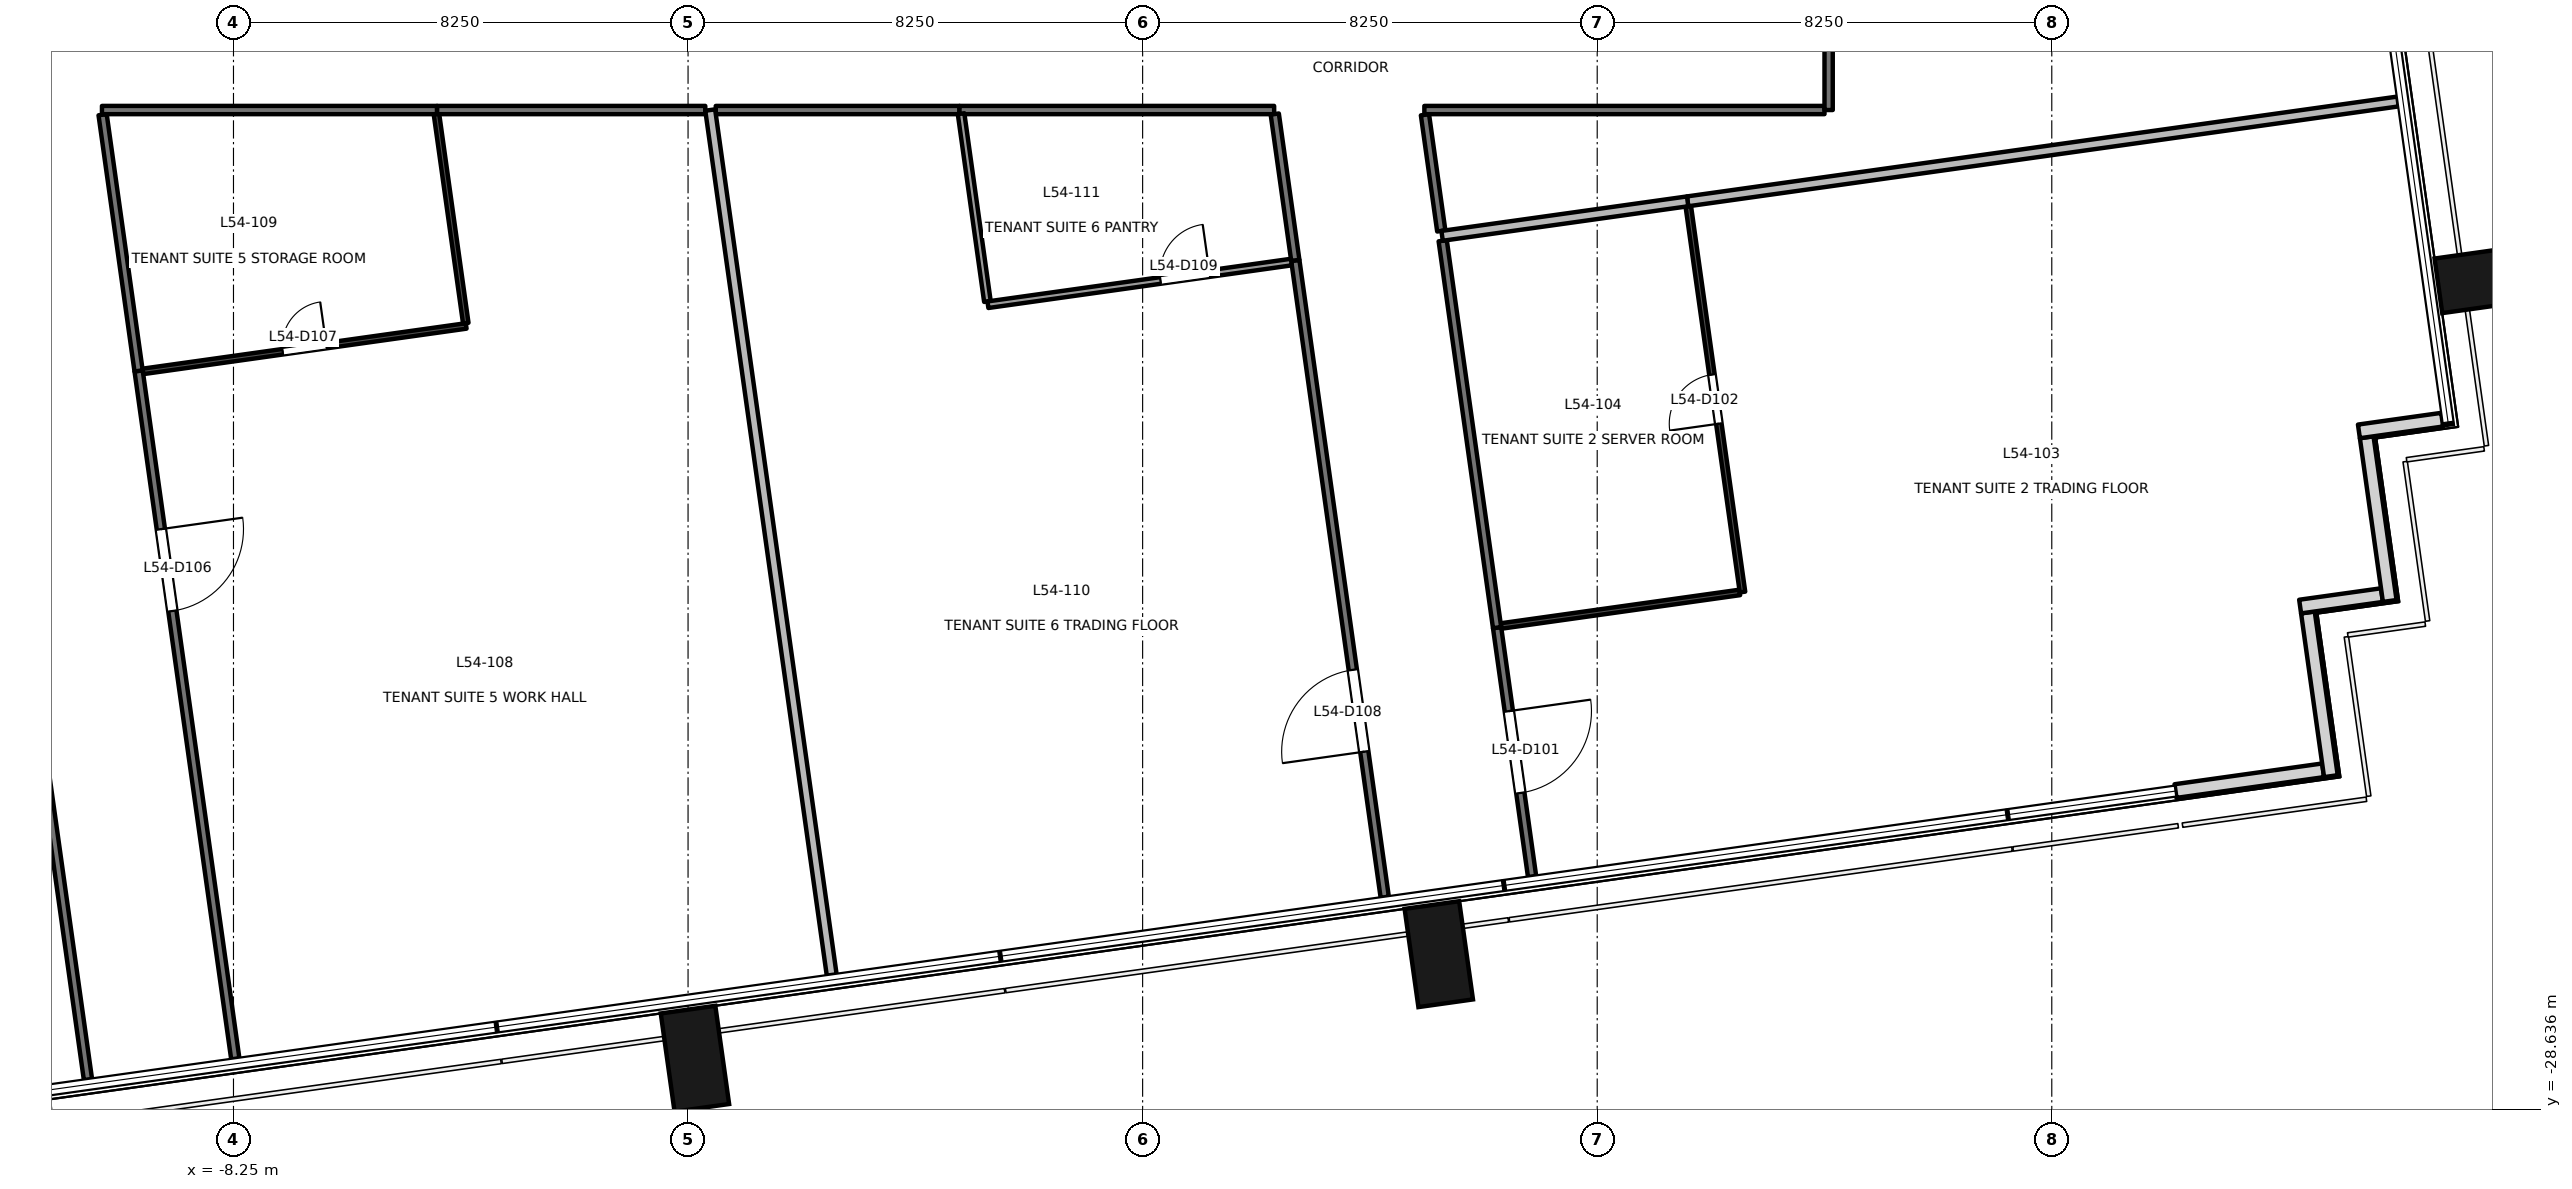
"""IFC4 building model, lengths in metres.
Left out: names, types, materials, properties, quantities, classifications, styles, units other than length and angle.
Written with IfcOpenShell. Run it as: python <this file> out.ifc"""

import sys

from ifc_helpers import new_model, si_unit, direction, frame, frame_2d, origin, origin_2d, place, context, subcontext, project, spatial, rectangle, extrude, element, fill, save


model = new_model("IFC4")
c1 = context("Model", 3, precision=1e-05, world=origin(), true_north=direction((0.0, 1.0)))
c2 = subcontext(c1, "Body", "Model", "MODEL_VIEW")
j1 = project(units=[si_unit("LENGTHUNIT", "METRE"), si_unit("PLANEANGLEUNIT", "RADIAN")], contexts=[c1])
p1 = place(None, origin())
s1 = spatial("IfcSite", under=j1, at=p1, CompositionType="ELEMENT")
p2 = place(p1, origin())
s2 = spatial("IfcBuilding", under=s1, at=p2, CompositionType="ELEMENT")
p3 = place(p2, frame((0.0, 0.0, 236.9)))
s3 = spatial("IfcBuildingStorey", under=s2, at=p3, CompositionType="ELEMENT", Elevation=236.9)
for number, where, z_axis, x_axis in (
    (1, (-11.971, -29.416, -0.2), (0.0, 0.0, 1.0), (0.99, 0.139, 0.0)),
    (2, (0.125, -27.716, -0.2), (0.0, 0.0, 1.0), (0.99, 0.139, 0.0)),
    (3, (13.625, -25.818, -0.2), (0.0, 0.0, 1.0), (0.99, 0.139, 0.0)),
    (4, (32.658, -13.565, -0.2), (0.0, 0.0, 1.0), (-0.139, 0.99, 0.0)),
):
    element("IfcColumn", number, at=place(p3, frame(where, z_axis=z_axis, x_axis=x_axis)), inside=s3, PredefinedType="COLUMN", context=c2, shape_type="SweptSolid", body=[
        extrude(rectangle(XDim=1.0, YDim=1.8, at=origin_2d()), origin(), (0.0, 0.0, 1.0), 3.9),
    ])
p4 = place(p3, frame((26.995, -22.859, 0.0), z_axis=(0.0, 0.0, 1.0), x_axis=(0.99024510326, 0.139336411139, 0.0)))
e5 = element("IfcWall", 5, at=p4, inside=s3, PredefinedType="SOLIDWALL", context=c2, shape_type="SweptSolid", body=[
    extrude(rectangle(XDim=2.705, YDim=0.25, at=frame_2d((1.353, 0.0))), origin(), (0.0, 0.0, 1.0), 3.7),
])
p5 = place(p3, frame((29.815, -22.588, 0.0), z_axis=(0.0, 0.0, 1.0), x_axis=(-0.138983028379, 0.9902947631, 0.0)))
e6 = element("IfcWall", 6, at=p5, inside=s3, PredefinedType="SOLIDWALL", context=c2, shape_type="SweptSolid", body=[
    extrude(rectangle(XDim=3.0, YDim=0.25, at=frame_2d((1.5, 0.0))), origin(), (0.0, 0.0, 1.0), 3.7),
])
p6 = place(p3, frame((29.257, -19.51, 0.0), z_axis=(0.0, 0.0, 1.0), x_axis=(0.990330117064, 0.138730887823, 0.0)))
e7 = element("IfcWall", 7, at=p6, inside=s3, PredefinedType="SOLIDWALL", context=c2, shape_type="SweptSolid", body=[
    extrude(rectangle(XDim=1.499, YDim=0.25, at=frame_2d((0.75, 0.0))), origin(), (0.0, 0.0, 1.0), 3.7),
])
p7 = place(p3, frame((30.883, -19.409, 0.0), z_axis=(0.0, 0.0, 1.0), x_axis=(-0.139324658755, 0.990246756855, 0.0)))
e8 = element("IfcWall", 8, at=p7, inside=s3, PredefinedType="SOLIDWALL", context=c2, shape_type="SweptSolid", body=[
    extrude(rectangle(XDim=3.0, YDim=0.25, at=frame_2d((1.5, 0.0))), origin(), (0.0, 0.0, 1.0), 3.7),
])
p8 = place(p3, frame((30.324, -16.332, 0.0), z_axis=(0.0, 0.0, 1.0), x_axis=(0.990238641016, 0.139382329723, 0.0)))
e9 = element("IfcWall", 9, at=p8, inside=s3, PredefinedType="SOLIDWALL", context=c2, shape_type="SweptSolid", body=[
    extrude(rectangle(XDim=1.526, YDim=0.25, at=frame_2d((0.763, 0.0))), origin(), (0.0, 0.0, 1.0), 3.7),
])
p9 = place(p3, frame((-10.891, -28.093, 0.0), z_axis=(0.0, 0.0, 1.0), x_axis=(-0.139139234553, 0.990272827764, 0.0)))
e10 = element("IfcWall", 10, at=p9, inside=s3, PredefinedType="PARTITIONING", context=c2, shape_type="SweptSolid", body=[
    extrude(rectangle(XDim=17.766, YDim=0.15, at=frame_2d((8.883, 0.0))), origin(), (0.0, 0.0, 1.0), 3.7),
])
p10 = place(p9, frame((8.133, 0.0, 0.0)))
e11 = element("IfcOpeningElement", 11, at=p10, cuts=e10, PredefinedType="OPENING", context=c2, shape_type="SweptSolid", body=[
    extrude(rectangle(XDim=1.5, YDim=2.1, at=frame_2d((0.75, 1.05))), frame((0.0, 0.085, 0.0), z_axis=(0.0, -1.0, 0.0), x_axis=(1.0, 0.0, 0.0)), (0.0, 0.0, 1.0), 0.171),
])
p11 = place(p3, frame((14.683, -19.893, 0.0), z_axis=(0.0, 0.0, 1.0), x_axis=(0.139247448871, -0.990257616978, 0.0)))
e12 = element("IfcWall", 12, at=p11, inside=s3, PredefinedType="PARTITIONING", context=c2, shape_type="SweptSolid", body=[
    extrude(rectangle(XDim=4.56, YDim=0.15, at=frame_2d((2.28, 0.0))), origin(), (0.0, 0.0, 1.0), 3.7),
])
p12 = place(p11, frame((1.53, 0.0, 0.0)))
e13 = element("IfcOpeningElement", 13, at=p12, cuts=e12, PredefinedType="OPENING", context=c2, shape_type="SweptSolid", body=[
    extrude(rectangle(XDim=1.5, YDim=2.1, at=frame_2d((0.75, 1.05))), frame((0.0, 0.085, 0.0), z_axis=(0.0, -1.0, 0.0), x_axis=(1.0, 0.0, 0.0)), (0.0, 0.0, 1.0), 0.171),
])
p13 = place(p3, frame((13.696, -12.872, 0.0), z_axis=(0.0, 0.0, 1.0), x_axis=(0.139217899128, -0.990261771736, 0.0)))
e14 = element("IfcWall", 14, at=p13, inside=s3, PredefinedType="PARTITIONING", context=c2, shape_type="SweptSolid", body=[
    extrude(rectangle(XDim=7.09, YDim=0.15, at=frame_2d((3.545, 0.0))), origin(), (0.0, 0.0, 1.0), 2.9),
])
p14 = place(p3, frame((13.374, -10.586, 0.0), z_axis=(0.0, 0.0, 1.0), x_axis=(0.13899652087, -0.990292869401, 0.0)))
e15 = element("IfcWall", 15, at=p14, inside=s3, PredefinedType="PARTITIONING", context=c2, shape_type="SweptSolid", body=[
    extrude(rectangle(XDim=2.129, YDim=0.15, at=frame_2d((1.064, 0.0))), origin(), (0.0, 0.0, 1.0), 2.9),
])
p15 = place(p3, frame((20.625, -10.5, 0.0), z_axis=(0.0, 0.0, 1.0), x_axis=(-1.0, 0.0, 0.0)))
e16 = element("IfcWall", 16, at=p15, inside=s3, PredefinedType="PARTITIONING", context=c2, shape_type="SweptSolid", body=[
    extrude(rectangle(XDim=7.262, YDim=0.15, at=frame_2d((3.631, 0.0))), origin(), (0.0, 0.0, 1.0), 2.9),
])
p16 = place(p3, frame((20.7, -2.797, 0.0), z_axis=(0.0, 0.0, 1.0), x_axis=(0.0, -1.0, 0.0)))
e17 = element("IfcWall", 17, at=p16, inside=s3, PredefinedType="PARTITIONING", context=c2, shape_type="SweptSolid", body=[
    extrude(rectangle(XDim=7.703, YDim=0.15, at=frame_2d((3.852, 0.0))), origin(), (0.0, 0.0, 1.0), 3.1),
])
p17 = place(p16, frame((3.401, 0.0, 0.0)))
e18 = element("IfcOpeningElement", 18, at=p17, cuts=e17, PredefinedType="OPENING", context=c2, shape_type="SweptSolid", body=[
    extrude(rectangle(XDim=0.9, YDim=2.1, at=frame_2d((0.45, 1.05))), frame((0.0, 0.085, 0.0), z_axis=(0.0, -1.0, 0.0), x_axis=(1.0, 0.0, 0.0)), (0.0, 0.0, 1.0), 0.171),
])
p18 = place(p3, frame((-9.972, -15.233, 0.0), z_axis=(0.0, 0.0, 1.0), x_axis=(0.139200531242, -0.990264213279, 0.0)))
e19 = element("IfcWall", 19, at=p18, inside=s3, PredefinedType="PARTITIONING", context=c2, shape_type="SweptSolid", body=[
    extrude(rectangle(XDim=12.607, YDim=0.15, at=frame_2d((6.303, 0.0))), origin(), (0.0, 0.0, 1.0), 2.8),
])
p19 = place(p18, frame((2.901, 0.0, 0.0)))
e20 = element("IfcOpeningElement", 20, at=p19, cuts=e19, PredefinedType="OPENING", context=c2, shape_type="SweptSolid", body=[
    extrude(rectangle(XDim=1.5, YDim=2.1, at=frame_2d((0.75, 1.05))), frame((0.0, 0.085, 0.0), z_axis=(0.0, -1.0, 0.0), x_axis=(1.0, 0.0, 0.0)), (0.0, 0.0, 1.0), 0.171),
])
p20 = place(p3, frame((0.313, -10.5, 0.0), z_axis=(0.0, 0.0, 1.0), x_axis=(-1.0, 0.0, 0.0)))
e21 = element("IfcWall", 21, at=p20, inside=s3, PredefinedType="PARTITIONING", context=c2, shape_type="SweptSolid", body=[
    extrude(rectangle(XDim=4.87, YDim=0.15, at=frame_2d((2.435, 0.0))), origin(), (0.0, 0.0, 1.0), 2.8),
])
p21 = place(p3, frame((-10.625, -10.585, 0.0), z_axis=(0.0, 0.0, 1.0), x_axis=(0.139112996275, -0.990276514044, 0.0)))
e22 = element("IfcWall", 22, at=p21, inside=s3, PredefinedType="PARTITIONING", context=c2, shape_type="SweptSolid", body=[
    extrude(rectangle(XDim=4.695, YDim=0.15, at=frame_2d((2.347, 0.0))), origin(), (0.0, 0.0, 1.0), 3.7),
])
p22 = place(p3, frame((-4.557, -10.5, 0.0), z_axis=(0.0, 0.0, 1.0), x_axis=(-1.0, 0.0, 0.0)))
e23 = element("IfcWall", 23, at=p22, inside=s3, PredefinedType="PARTITIONING", context=c2, shape_type="SweptSolid", body=[
    extrude(rectangle(XDim=6.08, YDim=0.15, at=frame_2d((3.04, 0.0))), origin(), (0.0, 0.0, 1.0), 2.8),
])
p23 = place(p3, frame((4.926, -10.5, 0.0), z_axis=(0.0, 0.0, 1.0), x_axis=(-1.0, 0.0, 0.0)))
e24 = element("IfcWall", 24, at=p23, inside=s3, PredefinedType="PARTITIONING", context=c2, shape_type="SweptSolid", body=[
    extrude(rectangle(XDim=4.423, YDim=0.15, at=frame_2d((2.211, 0.0))), origin(), (0.0, 0.0, 1.0), 2.8),
])
p24 = place(p3, frame((12.644, -24.785, 0.0), z_axis=(0.0, 0.0, 1.0), x_axis=(-0.139086535292, 0.990280230894, 0.0)))
e25 = element("IfcWall", 25, at=p24, inside=s3, PredefinedType="PARTITIONING", context=c2, shape_type="SweptSolid", body=[
    extrude(rectangle(XDim=11.669, YDim=0.15, at=frame_2d((5.835, 0.0))), origin(), (0.0, 0.0, 1.0), 3.7),
])
p25 = place(p24, frame((2.667, 0.0, 0.0)))
e26 = element("IfcOpeningElement", 26, at=p25, cuts=e25, PredefinedType="OPENING", context=c2, shape_type="SweptSolid", body=[
    extrude(rectangle(XDim=1.5, YDim=2.1, at=frame_2d((0.75, 1.05))), frame((0.0, 0.085, 0.0), z_axis=(0.0, -1.0, 0.0), x_axis=(1.0, 0.0, 0.0)), (0.0, 0.0, 1.0), 0.171),
])
p26 = place(p3, frame((10.637, -10.5, 0.0), z_axis=(0.0, 0.0, 1.0), x_axis=(-1.0, 0.0, 0.0)))
e27 = element("IfcWall", 27, at=p26, inside=s3, PredefinedType="PARTITIONING", context=c2, shape_type="SweptSolid", body=[
    extrude(rectangle(XDim=5.711, YDim=0.15, at=frame_2d((2.855, 0.0))), origin(), (0.0, 0.0, 1.0), 2.8),
])
p27 = place(p3, frame((11.021, -13.228, 0.0), z_axis=(0.0, 0.0, 1.0), x_axis=(-0.139139027609, 0.990272856841, 0.0)))
e28 = element("IfcWall", 28, at=p27, inside=s3, PredefinedType="PARTITIONING", context=c2, shape_type="SweptSolid", body=[
    extrude(rectangle(XDim=2.681, YDim=0.15, at=frame_2d((1.341, 0.0))), origin(), (0.0, 0.0, 1.0), 3.7),
])
p28 = place(p3, frame((14.755, -19.863, 0.0), z_axis=(0.0, 0.0, 1.0), x_axis=(0.990258502699, 0.139241149923, 0.0)))
e29 = element("IfcWall", 29, at=p28, inside=s3, PredefinedType="PARTITIONING", context=c2, shape_type="SweptSolid", body=[
    extrude(rectangle(XDim=4.375, YDim=0.1, at=frame_2d((2.188, 0.0))), origin(), (0.0, 0.0, 1.0), 3.7),
])
p29 = place(p3, frame((19.137, -19.247, 0.0), z_axis=(0.0, 0.0, 1.0), x_axis=(-0.139168056016, 0.990268777749, 0.0)))
e30 = element("IfcWall", 30, at=p29, inside=s3, PredefinedType="PARTITIONING", context=c2, shape_type="SweptSolid", body=[
    extrude(rectangle(XDim=7.07, YDim=0.1, at=frame_2d((3.535, 0.0))), origin(), (0.0, 0.0, 1.0), 3.7),
])
p30 = place(p29, frame((3.085, 0.0, 0.0)))
e31 = element("IfcOpeningElement", 31, at=p30, cuts=e30, PredefinedType="OPENING", context=c2, shape_type="SweptSolid", body=[
    extrude(rectangle(XDim=0.9, YDim=2.1, at=frame_2d((0.45, 1.05))), frame((0.0, 0.061, 0.0), z_axis=(0.0, -1.0, 0.0), x_axis=(1.0, 0.0, 0.0)), (0.0, 0.0, 1.0), 0.121),
])
p31 = place(p3, frame((18.141, -12.157, 0.0), z_axis=(0.0, 0.0, 1.0), x_axis=(0.99026760598, 0.139176393637, 0.0)))
e32 = element("IfcWall", 32, at=p31, inside=s3, PredefinedType="PARTITIONING", context=c2, shape_type="SweptSolid", body=[
    extrude(rectangle(XDim=13.02, YDim=0.18, at=frame_2d((6.51, 0.0))), origin(), (0.0, 0.0, 1.0), 3.7),
])
p32 = place(p3, frame((13.685, -12.783, 0.0), z_axis=(0.0, 0.0, 1.0), x_axis=(0.99027667576, 0.139111845094, 0.0)))
e33 = element("IfcWall", 33, at=p32, inside=s3, PredefinedType="PARTITIONING", context=c2, shape_type="SweptSolid", body=[
    extrude(rectangle(XDim=4.5, YDim=0.18, at=frame_2d((2.25, 0.0))), origin(), (0.0, 0.0, 1.0), 3.7),
])
p33 = place(p3, frame((-9.894, -15.243, 0.0), z_axis=(0.0, 0.0, 1.0), x_axis=(0.990258620858, 0.139240309595, 0.0)))
e34 = element("IfcWall", 34, at=p33, inside=s3, PredefinedType="PARTITIONING", context=c2, shape_type="SweptSolid", body=[
    extrude(rectangle(XDim=5.925, YDim=0.1, at=frame_2d((2.962, 0.0))), origin(), (0.0, 0.0, 1.0), 2.8),
])
p34 = place(p33, frame((2.562, 0.0, 0.0)))
e35 = element("IfcOpeningElement", 35, at=p34, cuts=e34, PredefinedType="OPENING", context=c2, shape_type="SweptSolid", body=[
    extrude(rectangle(XDim=0.8, YDim=2.1, at=frame_2d((0.4, 1.05))), frame((0.0, 0.061, 0.0), z_axis=(0.0, -1.0, 0.0), x_axis=(1.0, 0.0, 0.0)), (0.0, 0.0, 1.0), 0.121),
])
p35 = place(p3, frame((-4.034, -14.368, 0.0), z_axis=(0.0, 0.0, 1.0), x_axis=(-0.138899955752, 0.990306418384, 0.0)))
e36 = element("IfcWall", 36, at=p35, inside=s3, PredefinedType="PARTITIONING", context=c2, shape_type="SweptSolid", body=[
    extrude(rectangle(XDim=3.837, YDim=0.1, at=frame_2d((1.918, 0.0))), origin(), (0.0, 0.0, 1.0), 2.8),
])
p36 = place(p3, frame((0.402, -10.5, 0.0), z_axis=(0.0, 0.0, 1.0), x_axis=(0.139104966254, -0.99027764206, 0.0)))
e37 = element("IfcWall", 37, at=p36, inside=s3, PredefinedType="PARTITIONING", context=c2, shape_type="SweptSolid", body=[
    extrude(rectangle(XDim=15.85, YDim=0.18, at=frame_2d((7.925, 0.0))), origin(), (0.0, 0.0, 1.0), 3.7),
])
p37 = place(p3, frame((4.955, -10.567, 0.0), z_axis=(0.0, 0.0, 1.0), x_axis=(0.138937352788, -0.990301172372, 0.0)))
e38 = element("IfcWall", 38, at=p37, inside=s3, PredefinedType="PARTITIONING", context=c2, shape_type="SweptSolid", body=[
    extrude(rectangle(XDim=3.441, YDim=0.12, at=frame_2d((1.72, 0.0))), origin(), (0.0, 0.0, 1.0), 3.7),
])
p38 = place(p3, frame((5.442, -14.033, 0.0), z_axis=(0.0, 0.0, 1.0), x_axis=(0.990269155404, 0.139165368738, 0.0)))
e39 = element("IfcWall", 39, at=p38, inside=s3, PredefinedType="PARTITIONING", context=c2, shape_type="SweptSolid", body=[
    extrude(rectangle(XDim=5.561, YDim=0.12, at=frame_2d((2.781, 0.0))), origin(), (0.0, 0.0, 1.0), 2.8),
])
p39 = place(p38, frame((3.163, 0.0, 0.0)))
e40 = element("IfcOpeningElement", 40, at=p39, cuts=e39, PredefinedType="OPENING", context=c2, shape_type="SweptSolid", body=[
    extrude(rectangle(XDim=0.9, YDim=2.1, at=frame_2d((0.45, 1.05))), frame((0.0, 0.071, 0.0), z_axis=(0.0, -1.0, 0.0), x_axis=(1.0, 0.0, 0.0)), (0.0, 0.0, 1.0), 0.141),
])
p40 = place(p12, origin())
e41 = element("IfcDoor", 41, at=p40, inside=s3, OperationType="DOUBLE_DOOR_SINGLE_SWING", PredefinedType="DOOR", context=c2, shape_type="SweptSolid", body=[
    extrude(rectangle(XDim=1.5, YDim=2.1, at=frame_2d((0.75, 1.05))), frame((0.0, 0.025, 0.0), z_axis=(0.0, -1.0, 0.0), x_axis=(1.0, 0.0, 0.0)), (0.0, 0.0, 1.0), 0.05),
])
fill(e13, e41)
p41 = place(p30, origin())
e42 = element("IfcDoor", 42, at=p41, inside=s3, OperationType="SINGLE_SWING_LEFT", PredefinedType="DOOR", context=c2, shape_type="SweptSolid", body=[
    extrude(rectangle(XDim=0.9, YDim=2.1, at=frame_2d((0.45, 1.05))), frame((0.0, 0.025, 0.0), z_axis=(0.0, -1.0, 0.0), x_axis=(1.0, 0.0, 0.0)), (0.0, 0.0, 1.0), 0.05),
])
fill(e31, e42)
p42 = place(p19, origin())
e43 = element("IfcDoor", 43, at=p42, inside=s3, OperationType="DOUBLE_DOOR_SINGLE_SWING", PredefinedType="DOOR", context=c2, shape_type="SweptSolid", body=[
    extrude(rectangle(XDim=1.5, YDim=2.1, at=frame_2d((0.75, 1.05))), frame((0.0, 0.025, 0.0), z_axis=(0.0, -1.0, 0.0), x_axis=(1.0, 0.0, 0.0)), (0.0, 0.0, 1.0), 0.05),
])
fill(e20, e43)
p43 = place(p34, origin())
e44 = element("IfcDoor", 44, at=p43, inside=s3, OperationType="SINGLE_SWING_RIGHT", PredefinedType="DOOR", context=c2, shape_type="SweptSolid", body=[
    extrude(rectangle(XDim=0.8, YDim=2.1, at=frame_2d((0.4, 1.05))), frame((0.0, 0.025, 0.0), z_axis=(0.0, -1.0, 0.0), x_axis=(1.0, 0.0, 0.0)), (0.0, 0.0, 1.0), 0.05),
])
fill(e35, e44)
p44 = place(p25, origin())
e45 = element("IfcDoor", 45, at=p44, inside=s3, OperationType="DOUBLE_DOOR_SINGLE_SWING", PredefinedType="DOOR", context=c2, shape_type="SweptSolid", body=[
    extrude(rectangle(XDim=1.5, YDim=2.1, at=frame_2d((0.75, 1.05))), frame((0.0, 0.025, 0.0), z_axis=(0.0, -1.0, 0.0), x_axis=(1.0, 0.0, 0.0)), (0.0, 0.0, 1.0), 0.05),
])
fill(e26, e45)
p45 = place(p39, origin())
e46 = element("IfcDoor", 46, at=p45, inside=s3, OperationType="SINGLE_SWING_RIGHT", PredefinedType="DOOR", context=c2, shape_type="SweptSolid", body=[
    extrude(rectangle(XDim=0.9, YDim=2.1, at=frame_2d((0.45, 1.05))), frame((0.0, 0.025, 0.0), z_axis=(0.0, -1.0, 0.0), x_axis=(1.0, 0.0, 0.0)), (0.0, 0.0, 1.0), 0.05),
])
fill(e40, e46)
save(model, sys.argv[1])
